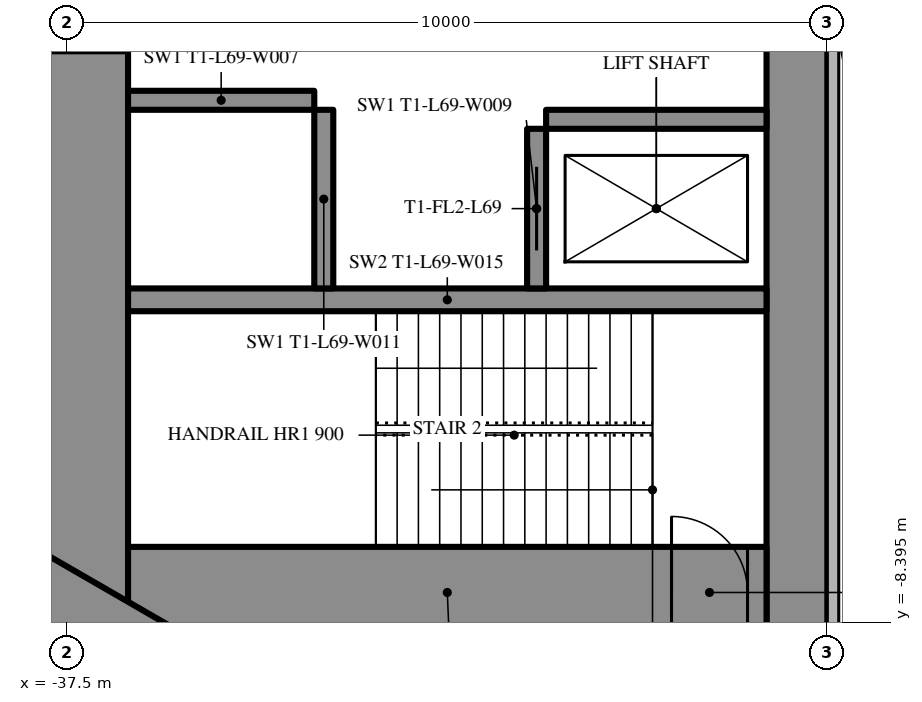
"""IFC4 building model, lengths in metres.
Left out: names, types, materials, properties, quantities, classifications, styles, units other than length and angle.
Written with IfcOpenShell. Run it as: python <this file> out.ifc"""

import sys

from ifc_helpers import new_model, si_unit, direction, frame, frame_2d, origin, place, context, subcontext, project, spatial, rectangle, extrude, element, fill, save


model = new_model("IFC4")
c1 = context("Model", 3, precision=1e-05, world=origin(), true_north=direction((0.0, 1.0)))
c2 = subcontext(c1, "Body", "Model", "MODEL_VIEW")
j1 = project(units=[si_unit("LENGTHUNIT", "METRE"), si_unit("PLANEANGLEUNIT", "RADIAN")], contexts=[c1])
p1 = place(None, origin())
s1 = spatial("IfcSite", under=j1, at=p1, CompositionType="ELEMENT")
p2 = place(p1, origin())
s2 = spatial("IfcBuilding", under=s1, at=p2, CompositionType="ELEMENT")
p3 = place(p2, frame((0.0, 0.0, 263.3)))
s3 = spatial("IfcBuildingStorey", under=s2, at=p3, CompositionType="ELEMENT", Elevation=263.3)
p4 = place(p3, frame((-27.9, 8.6, 0.0), z_axis=(0.0, 0.0, 1.0), x_axis=(0.0, -1.0, 0.0)))
e1 = element("IfcWall", 1, at=p4, inside=s3, PredefinedType="SHEAR", context=c2, shape_type="SweptSolid", body=[
    extrude(rectangle(XDim=17.2, YDim=0.8, at=frame_2d((8.6, 0.0))), origin(), (0.0, 0.0, 1.0), 5.0),
])
p5 = place(p4, frame((6.95, 0.0, 0.0)))
e2 = element("IfcOpeningElement", 2, at=p5, cuts=e1, PredefinedType="OPENING", context=c2, shape_type="SweptSolid", body=[
    extrude(rectangle(XDim=0.9, YDim=2.2, at=frame_2d((0.45, 1.1))), frame((0.0, 0.41, 0.0), z_axis=(0.0, -1.0, 0.0), x_axis=(1.0, 0.0, 0.0)), (0.0, 0.0, 1.0), 0.82),
])
p6 = place(p3, frame((-37.3, 8.6, 0.0), z_axis=(0.0, 0.0, 1.0), x_axis=(0.0, -1.0, 0.0)))
e3 = element("IfcWall", 3, at=p6, inside=s3, PredefinedType="SHEAR", context=c2, shape_type="SweptSolid", body=[
    extrude(rectangle(XDim=17.2, YDim=1.2, at=frame_2d((8.6, 0.0))), origin(), (0.0, 0.0, 1.0), 5.0),
])
p7 = place(p6, frame((7.7, 0.0, 0.0)))
e4 = element("IfcOpeningElement", 4, at=p7, cuts=e3, PredefinedType="OPENING", context=c2, shape_type="SweptSolid", body=[
    extrude(rectangle(XDim=1.8, YDim=2.2, at=frame_2d((0.9, 1.1))), frame((0.0, 0.61, 0.0), z_axis=(0.0, -1.0, 0.0), x_axis=(1.0, 0.0, 0.0)), (0.0, 0.0, 1.0), 1.22),
])
p8 = place(p3, frame((-28.3, -8.0, 0.0), z_axis=(0.0, 0.0, 1.0), x_axis=(-1.0, 0.0, 0.0)))
e5 = element("IfcWall", 5, at=p8, inside=s3, PredefinedType="SHEAR", context=c2, shape_type="SweptSolid", body=[
    extrude(rectangle(XDim=8.4, YDim=1.2, at=frame_2d((4.2, 0.0))), origin(), (0.0, 0.0, 1.0), 5.0),
])
p9 = place(p8, frame((0.25, 0.0, 0.0)))
e6 = element("IfcOpeningElement", 6, at=p9, cuts=e5, PredefinedType="OPENING", context=c2, shape_type="SweptSolid", body=[
    extrude(rectangle(XDim=1.0, YDim=2.2, at=frame_2d((0.5, 1.1))), frame((0.0, 0.61, 0.0), z_axis=(0.0, -1.0, 0.0), x_axis=(1.0, 0.0, 0.0)), (0.0, 0.0, 1.0), 1.22),
])
p10 = place(p3, frame((-28.3, -4.15, 0.0), z_axis=(0.0, 0.0, 1.0), x_axis=(-1.0, 0.0, 0.0)))
e7 = element("IfcWall", 7, at=p10, inside=s3, PredefinedType="SHEAR", context=c2, shape_type="SweptSolid", body=[
    extrude(rectangle(XDim=8.4, YDim=0.3, at=frame_2d((4.2, 0.0))), origin(), (0.0, 0.0, 1.0), 5.0),
])
p11 = place(p3, frame((-31.325, -1.9, 0.0), z_axis=(0.0, 0.0, 1.0), x_axis=(0.0, -1.0, 0.0)))
e8 = element("IfcWall", 8, at=p11, inside=s3, PredefinedType="SHEAR", context=c2, shape_type="SweptSolid", body=[
    extrude(rectangle(XDim=2.1, YDim=0.25, at=frame_2d((1.05, 0.0))), origin(), (0.0, 0.0, 1.0), 5.0),
])
p12 = place(p11, frame((0.5, 0.0, 0.0)))
e9 = element("IfcOpeningElement", 9, at=p12, cuts=e8, PredefinedType="OPENING", context=c2, shape_type="SweptSolid", body=[
    extrude(rectangle(XDim=1.1, YDim=2.2, at=frame_2d((0.55, 1.1))), frame((0.0, 0.135, 0.0), z_axis=(0.0, -1.0, 0.0), x_axis=(1.0, 0.0, 0.0)), (0.0, 0.0, 1.0), 0.27),
])
p13 = place(p3, frame((-34.125, -1.65, 0.0), z_axis=(0.0, 0.0, 1.0), x_axis=(0.0, -1.0, 0.0)))
e10 = element("IfcWall", 10, at=p13, inside=s3, PredefinedType="SHEAR", context=c2, shape_type="SweptSolid", body=[
    extrude(rectangle(XDim=2.35, YDim=0.25, at=frame_2d((1.175, 0.0))), origin(), (0.0, 0.0, 1.0), 5.0),
])
p14 = place(p3, frame((-28.3, -1.775, 0.0), z_axis=(0.0, 0.0, 1.0), x_axis=(-1.0, 0.0, 0.0)))
e11 = element("IfcWall", 11, at=p14, inside=s3, PredefinedType="SHEAR", context=c2, shape_type="SweptSolid", body=[
    extrude(rectangle(XDim=2.9, YDim=0.25, at=frame_2d((1.45, 0.0))), origin(), (0.0, 0.0, 1.0), 5.0),
])
p15 = place(p3, frame((-34.25, -1.525, 0.0), z_axis=(0.0, 0.0, 1.0), x_axis=(-1.0, 0.0, 0.0)))
e12 = element("IfcWall", 12, at=p15, inside=s3, PredefinedType="SHEAR", context=c2, shape_type="SweptSolid", body=[
    extrude(rectangle(XDim=2.45, YDim=0.25, at=frame_2d((1.225, 0.0))), origin(), (0.0, 0.0, 1.0), 5.0),
])
p16 = place(p3, frame((-27.2, -14.3, 0.0), z_axis=(0.0, 0.0, 1.0), x_axis=(-0.866024021859, 0.500002393557, 0.0)))
e13 = element("IfcWall", 13, at=p16, inside=s3, PredefinedType="SHEAR", context=c2, shape_type="SweptSolid", body=[
    extrude(rectangle(XDim=27.907, YDim=1.2, at=frame_2d((13.954, 0.0))), origin(), (0.0, 0.0, 1.0), 5.0),
])
p17 = place(p16, frame((4.6, 0.0, 0.0)))
e14 = element("IfcOpeningElement", 14, at=p17, cuts=e13, PredefinedType="OPENING", context=c2, shape_type="SweptSolid", body=[
    extrude(rectangle(XDim=1.0, YDim=2.2, at=frame_2d((0.5, 1.1))), frame((0.0, 0.61, 0.0), z_axis=(0.0, -1.0, 0.0), x_axis=(1.0, 0.0, 0.0)), (0.0, 0.0, 1.0), 1.22),
])
p18 = place(p16, frame((13.395, 0.0, 0.0)))
e15 = element("IfcOpeningElement", 15, at=p18, cuts=e13, PredefinedType="OPENING", context=c2, shape_type="SweptSolid", body=[
    extrude(rectangle(XDim=1.8, YDim=2.2, at=frame_2d((0.9, 1.1))), frame((0.0, 0.61, 0.0), z_axis=(0.0, -1.0, 0.0), x_axis=(1.0, 0.0, 0.0)), (0.0, 0.0, 1.0), 1.22),
])
p19 = place(p3, frame((-28.737, -16.068, 0.0), z_axis=(0.0, 0.0, 1.0), x_axis=(-0.866026220747, 0.499998584977, 0.0)))
e16 = element("IfcWall", 16, at=p19, inside=s3, PredefinedType="PARTITIONING", context=c2, shape_type="SweptSolid", body=[
    extrude(rectangle(XDim=32.017, YDim=0.2, at=frame_2d((16.008, 0.0))), origin(), (0.0, 0.0, 1.0), 4.75),
])
p20 = place(p19, frame((27.066, 0.0, 0.0)))
e17 = element("IfcOpeningElement", 17, at=p20, cuts=e16, PredefinedType="OPENING", context=c2, shape_type="SweptSolid", body=[
    extrude(rectangle(XDim=2.0, YDim=2.4, at=frame_2d((1.0, 1.2))), frame((0.0, 0.11, 0.0), z_axis=(0.0, -1.0, 0.0), x_axis=(1.0, 0.0, 0.0)), (0.0, 0.0, 1.0), 0.22),
])
p21 = place(p19, frame((21.266, 0.0, 0.0)))
e18 = element("IfcOpeningElement", 18, at=p21, cuts=e16, PredefinedType="OPENING", context=c2, shape_type="SweptSolid", body=[
    extrude(rectangle(XDim=2.0, YDim=2.4, at=frame_2d((1.0, 1.2))), frame((0.0, 0.11, 0.0), z_axis=(0.0, -1.0, 0.0), x_axis=(1.0, 0.0, 0.0)), (0.0, 0.0, 1.0), 0.22),
])
p22 = place(p19, frame((17.117, 0.0, 0.0)))
e19 = element("IfcOpeningElement", 19, at=p22, cuts=e16, PredefinedType="OPENING", context=c2, shape_type="SweptSolid", body=[
    extrude(rectangle(XDim=2.0, YDim=2.4, at=frame_2d((1.0, 1.2))), frame((0.0, 0.11, 0.0), z_axis=(0.0, -1.0, 0.0), x_axis=(1.0, 0.0, 0.0)), (0.0, 0.0, 1.0), 0.22),
])
p23 = place(p19, frame((7.134, 0.0, 0.0)))
e20 = element("IfcOpeningElement", 20, at=p23, cuts=e16, PredefinedType="OPENING", context=c2, shape_type="SweptSolid", body=[
    extrude(rectangle(XDim=2.0, YDim=2.4, at=frame_2d((1.0, 1.2))), frame((0.0, 0.11, 0.0), z_axis=(0.0, -1.0, 0.0), x_axis=(1.0, 0.0, 0.0)), (0.0, 0.0, 1.0), 0.22),
])
p24 = place(p9, origin())
e21 = element("IfcDoor", 21, at=p24, inside=s3, OperationType="SINGLE_SWING_RIGHT", PredefinedType="DOOR", context=c2, shape_type="SweptSolid", body=[
    extrude(rectangle(XDim=1.0, YDim=2.2, at=frame_2d((0.5, 1.1))), frame((0.0, 0.025, 0.0), z_axis=(0.0, -1.0, 0.0), x_axis=(1.0, 0.0, 0.0)), (0.0, 0.0, 1.0), 0.05),
])
fill(e6, e21)
p25 = place(p12, origin())
e22 = element("IfcDoor", 22, at=p25, inside=s3, OperationType="SLIDING_TO_LEFT", PredefinedType="USERDEFINED", context=c2, shape_type="SweptSolid", body=[
    extrude(rectangle(XDim=1.1, YDim=2.2, at=frame_2d((0.55, 1.1))), frame((0.0, 0.025, 0.0), z_axis=(0.0, -1.0, 0.0), x_axis=(1.0, 0.0, 0.0)), (0.0, 0.0, 1.0), 0.05),
])
fill(e9, e22)
save(model, sys.argv[1])
